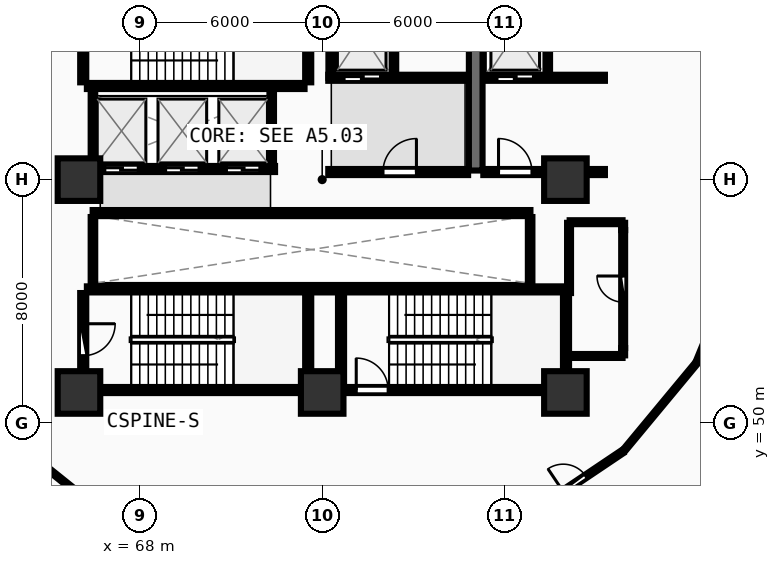
"""IFC4 building model, lengths in metres.
Left out: names, types, materials, properties, quantities, classifications, styles, units other than length and angle.
Written with IfcOpenShell. Run it as: python <this file> out.ifc"""

import sys

from ifc_helpers import new_model, si_unit, direction, frame, frame_2d, origin, origin_2d, place, context, subcontext, project, spatial, rectangle, extrude, element, fill, save


model = new_model("IFC4")
c1 = context("Model", 3, precision=1e-05, world=origin(), true_north=direction((0.0, 1.0)))
c2 = subcontext(c1, "Body", "Model", "MODEL_VIEW")
j1 = project(units=[si_unit("LENGTHUNIT", "METRE"), si_unit("PLANEANGLEUNIT", "RADIAN")], contexts=[c1])
p1 = place(None, origin())
s1 = spatial("IfcSite", under=j1, at=p1, CompositionType="ELEMENT")
p2 = place(p1, origin())
s2 = spatial("IfcBuilding", under=s1, at=p2, CompositionType="ELEMENT")
p3 = place(p2, frame((0.0, 0.0, 4.5)))
s3 = spatial("IfcBuildingStorey", under=s2, at=p3, CompositionType="ELEMENT", Elevation=4.5)
for number, where, z_axis, x_axis in (
    (1, (66.0, 51.0, 0.0), (0.0, 0.0, 1.0), (1.0, 0.0, 0.0)),
    (2, (74.0, 51.0, 0.0), (0.0, 0.0, 1.0), (1.0, 0.0, 0.0)),
    (3, (82.0, 51.0, 0.0), (0.0, 0.0, 1.0), (1.0, 0.0, 0.0)),
    (4, (82.0, 58.0, 0.0), (0.0, 0.0, 1.0), (1.0, 0.0, 0.0)),
    (5, (66.0, 58.0, 0.0), (0.0, 0.0, 1.0), (1.0, 0.0, 0.0)),
):
    element("IfcColumn", number, at=place(p3, frame(where, z_axis=z_axis, x_axis=x_axis)), inside=s3, PredefinedType="PILASTER", context=c2, shape_type="SweptSolid", body=[
        extrude(rectangle(XDim=1.4, YDim=1.4, at=origin_2d()), origin(), (0.0, 0.0, 1.0), 4.5),
    ])
p4 = place(p3, frame((66.26, 61.08, 0.0), z_axis=(0.0, 0.0, 1.0), x_axis=(1.0, 0.0, 0.0)))
e6 = element("IfcWall", 6, at=p4, inside=s3, PredefinedType="SHEAR", context=c2, shape_type="SweptSolid", body=[
    extrude(rectangle(XDim=7.16, YDim=0.2, at=frame_2d((3.58, 0.0))), origin(), (0.0, 0.0, 1.0), 4.2),
])
p5 = place(p3, frame((73.54, 61.2, 0.0), z_axis=(0.0, 0.0, 1.0), x_axis=(0.0, 1.0, 0.0)))
e7 = element("IfcWall", 7, at=p5, inside=s3, PredefinedType="SHEAR", context=c2, shape_type="SweptSolid", body=[
    extrude(rectangle(XDim=3.07, YDim=0.2, at=frame_2d((1.535, 0.0))), origin(), (0.0, 0.0, 1.0), 4.2),
])
p6 = place(p3, frame((66.14, 64.27, 0.0), z_axis=(0.0, 0.0, 1.0), x_axis=(0.0, -1.0, 0.0)))
e8 = element("IfcWall", 8, at=p6, inside=s3, PredefinedType="SHEAR", context=c2, shape_type="SweptSolid", body=[
    extrude(rectangle(XDim=3.07, YDim=0.2, at=frame_2d((1.535, 0.0))), origin(), (0.0, 0.0, 1.0), 4.2),
])
p7 = place(p6, frame((1.01, 0.0, 0.0)))
e9 = element("IfcOpeningElement", 9, at=p7, cuts=e8, PredefinedType="OPENING", context=c2, shape_type="SweptSolid", body=[
    extrude(rectangle(XDim=1.05, YDim=2.1, at=frame_2d((0.525, 1.05))), frame((0.0, 0.11, 0.0), z_axis=(0.0, -1.0, 0.0), x_axis=(1.0, 0.0, 0.0)), (0.0, 0.0, 1.0), 0.22),
])
p8 = place(p3, frame((74.0, 51.08, 0.0), z_axis=(0.0, 0.0, 1.0), x_axis=(1.0, 0.0, 0.0)))
e10 = element("IfcWall", 10, at=p8, inside=s3, PredefinedType="SHEAR", context=c2, shape_type="SweptSolid", body=[
    extrude(rectangle(XDim=7.9, YDim=0.2, at=frame_2d((3.95, 0.0))), origin(), (0.0, 0.0, 1.0), 4.2),
])
p9 = place(p8, frame((1.12, 0.0, 0.0)))
e11 = element("IfcOpeningElement", 11, at=p9, cuts=e10, PredefinedType="OPENING", context=c2, shape_type="SweptSolid", body=[
    extrude(rectangle(XDim=1.05, YDim=2.1, at=frame_2d((0.525, 1.05))), frame((0.0, 0.11, 0.0), z_axis=(0.0, -1.0, 0.0), x_axis=(1.0, 0.0, 0.0)), (0.0, 0.0, 1.0), 0.22),
])
p10 = place(p3, frame((82.02, 51.2, 0.0), z_axis=(0.0, 0.0, 1.0), x_axis=(0.0, 1.0, 0.0)))
e12 = element("IfcWall", 12, at=p10, inside=s3, PredefinedType="SHEAR", context=c2, shape_type="SweptSolid", body=[
    extrude(rectangle(XDim=3.07, YDim=0.2, at=frame_2d((1.535, 0.0))), origin(), (0.0, 0.0, 1.0), 4.2),
])
p11 = place(p3, frame((81.9, 54.39, 0.0), z_axis=(0.0, 0.0, 1.0), x_axis=(-1.0, 0.0, 0.0)))
e13 = element("IfcWall", 13, at=p11, inside=s3, PredefinedType="SHEAR", context=c2, shape_type="SweptSolid", body=[
    extrude(rectangle(XDim=8.46, YDim=0.2, at=frame_2d((4.23, 0.0))), origin(), (0.0, 0.0, 1.0), 4.2),
])
p12 = place(p3, frame((74.62, 54.27, 0.0), z_axis=(0.0, 0.0, 1.0), x_axis=(0.0, -1.0, 0.0)))
e14 = element("IfcWall", 14, at=p12, inside=s3, PredefinedType="SHEAR", context=c2, shape_type="SweptSolid", body=[
    extrude(rectangle(XDim=3.07, YDim=0.2, at=frame_2d((1.535, 0.0))), origin(), (0.0, 0.0, 1.0), 4.2),
])
p13 = place(p3, frame((66.26, 51.08, 0.0), z_axis=(0.0, 0.0, 1.0), x_axis=(1.0, 0.0, 0.0)))
e15 = element("IfcWall", 15, at=p13, inside=s3, PredefinedType="SHEAR", context=c2, shape_type="SweptSolid", body=[
    extrude(rectangle(XDim=7.16, YDim=0.2, at=frame_2d((3.58, 0.0))), origin(), (0.0, 0.0, 1.0), 4.2),
])
p14 = place(p3, frame((73.54, 51.2, 0.0), z_axis=(0.0, 0.0, 1.0), x_axis=(0.0, 1.0, 0.0)))
e16 = element("IfcWall", 16, at=p14, inside=s3, PredefinedType="SHEAR", context=c2, shape_type="SweptSolid", body=[
    extrude(rectangle(XDim=3.07, YDim=0.2, at=frame_2d((1.535, 0.0))), origin(), (0.0, 0.0, 1.0), 4.2),
])
p15 = place(p3, frame((73.42, 54.39, 0.0), z_axis=(0.0, 0.0, 1.0), x_axis=(-1.0, 0.0, 0.0)))
e17 = element("IfcWall", 17, at=p15, inside=s3, PredefinedType="SHEAR", context=c2, shape_type="SweptSolid", body=[
    extrude(rectangle(XDim=7.16, YDim=0.2, at=frame_2d((3.58, 0.0))), origin(), (0.0, 0.0, 1.0), 4.2),
])
p16 = place(p3, frame((66.14, 54.27, 0.0), z_axis=(0.0, 0.0, 1.0), x_axis=(0.0, -1.0, 0.0)))
e18 = element("IfcWall", 18, at=p16, inside=s3, PredefinedType="SHEAR", context=c2, shape_type="SweptSolid", body=[
    extrude(rectangle(XDim=3.07, YDim=0.2, at=frame_2d((1.535, 0.0))), origin(), (0.0, 0.0, 1.0), 4.2),
])
p17 = place(p16, frame((1.01, 0.0, 0.0)))
e19 = element("IfcOpeningElement", 19, at=p17, cuts=e18, PredefinedType="OPENING", context=c2, shape_type="SweptSolid", body=[
    extrude(rectangle(XDim=1.05, YDim=2.1, at=frame_2d((0.525, 1.05))), frame((0.0, 0.11, 0.0), z_axis=(0.0, -1.0, 0.0), x_axis=(1.0, 0.0, 0.0)), (0.0, 0.0, 1.0), 0.22),
])
p18 = place(p3, frame((79.05, 58.3, 0.0), z_axis=(0.0, 0.0, 1.0), x_axis=(0.0, 1.0, 0.0)))
e20 = element("IfcWall", 20, at=p18, inside=s3, PredefinedType="SHEAR", context=c2, shape_type="SweptSolid", body=[
    extrude(rectangle(XDim=6.3, YDim=0.45, at=frame_2d((3.15, 0.0))), origin(), (0.0, 0.0, 1.0), 4.2),
])
p19 = place(p3, frame((74.2, 61.35, 0.0), z_axis=(0.0, 0.0, 1.0), x_axis=(1.0, 0.0, 0.0)))
e21 = element("IfcWall", 21, at=p19, inside=s3, PredefinedType="SOLIDWALL", context=c2, shape_type="SweptSolid", body=[
    extrude(rectangle(XDim=4.6, YDim=0.2, at=frame_2d((2.3, 0.0))), origin(), (0.0, 0.0, 1.0), 4.19),
])
p20 = place(p19, frame((0.52, 0.0, 0.0)))
e22 = element("IfcOpeningElement", 22, at=p20, cuts=e21, PredefinedType="OPENING", context=c2, shape_type="SweptSolid", body=[
    extrude(rectangle(XDim=1.2, YDim=2.15, at=frame_2d((0.6, 1.075))), frame((0.0, 0.11, 0.0), z_axis=(0.0, -1.0, 0.0), x_axis=(1.0, 0.0, 0.0)), (0.0, 0.0, 1.0), 0.22),
])
p21 = place(p3, frame((74.28, 61.35, 0.0), z_axis=(0.0, 0.0, 1.0), x_axis=(0.0, 1.0, 0.0)))
e23 = element("IfcWall", 23, at=p21, inside=s3, PredefinedType="PARTITIONING", context=c2, shape_type="SweptSolid", body=[
    extrude(rectangle(XDim=2.97, YDim=0.15, at=frame_2d((1.485, 0.0))), origin(), (0.0, 0.0, 1.0), 4.19),
])
p22 = place(p3, frame((76.36, 61.48, 0.0), z_axis=(0.0, 0.0, 1.0), x_axis=(0.0, 1.0, 0.0)))
e24 = element("IfcWall", 24, at=p22, inside=s3, PredefinedType="PARTITIONING", context=c2, shape_type="SweptSolid", body=[
    extrude(rectangle(XDim=2.84, YDim=0.15, at=frame_2d((1.42, 0.0))), origin(), (0.0, 0.0, 1.0), 4.19),
])
p23 = place(p3, frame((79.3, 61.35, 0.0), z_axis=(0.0, 0.0, 1.0), x_axis=(1.0, 0.0, 0.0)))
e25 = element("IfcWall", 25, at=p23, inside=s3, PredefinedType="SOLIDWALL", context=c2, shape_type="SweptSolid", body=[
    extrude(rectangle(XDim=4.0, YDim=0.2, at=frame_2d((2.0, 0.0))), origin(), (0.0, 0.0, 1.0), 3.485),
])
p24 = place(p23, frame((0.45, 0.0, 0.0)))
e26 = element("IfcOpeningElement", 26, at=p24, cuts=e25, PredefinedType="OPENING", context=c2, shape_type="SweptSolid", body=[
    extrude(rectangle(XDim=1.2, YDim=2.15, at=frame_2d((0.6, 1.075))), frame((0.0, 0.11, 0.0), z_axis=(0.0, -1.0, 0.0), x_axis=(1.0, 0.0, 0.0)), (0.0, 0.0, 1.0), 0.22),
])
p25 = place(p3, frame((81.42, 61.48, 0.0), z_axis=(0.0, 0.0, 1.0), x_axis=(0.0, 1.0, 0.0)))
e27 = element("IfcWall", 27, at=p25, inside=s3, PredefinedType="PARTITIONING", context=c2, shape_type="SweptSolid", body=[
    extrude(rectangle(XDim=2.84, YDim=0.15, at=frame_2d((1.42, 0.0))), origin(), (0.0, 0.0, 1.0), 4.19),
])
p26 = place(p3, frame((74.2, 58.25, 0.0), z_axis=(0.0, 0.0, 1.0), x_axis=(1.0, 0.0, 0.0)))
e28 = element("IfcWall", 28, at=p26, inside=s3, PredefinedType="SOLIDWALL", context=c2, shape_type="SweptSolid", body=[
    extrude(rectangle(XDim=4.6, YDim=0.2, at=frame_2d((2.3, 0.0))), origin(), (0.0, 0.0, 1.0), 4.19),
])
p27 = place(p26, frame((1.8, 0.0, 0.0)))
e29 = element("IfcOpeningElement", 29, at=p27, cuts=e28, PredefinedType="OPENING", context=c2, shape_type="SweptSolid", body=[
    extrude(rectangle(XDim=1.1, YDim=2.1, at=frame_2d((0.55, 1.05))), frame((0.0, 0.11, 0.0), z_axis=(0.0, -1.0, 0.0), x_axis=(1.0, 0.0, 0.0)), (0.0, 0.0, 1.0), 0.22),
])
p28 = place(p3, frame((79.3, 58.25, 0.0), z_axis=(0.0, 0.0, 1.0), x_axis=(1.0, 0.0, 0.0)))
e30 = element("IfcWall", 30, at=p28, inside=s3, PredefinedType="SOLIDWALL", context=c2, shape_type="SweptSolid", body=[
    extrude(rectangle(XDim=4.0, YDim=0.2, at=frame_2d((2.0, 0.0))), origin(), (0.0, 0.0, 1.0), 3.485),
])
p29 = place(p28, frame((0.5, 0.0, 0.0)))
e31 = element("IfcOpeningElement", 31, at=p29, cuts=e30, PredefinedType="OPENING", context=c2, shape_type="SweptSolid", body=[
    extrude(rectangle(XDim=1.1, YDim=2.1, at=frame_2d((0.55, 1.05))), frame((0.0, 0.11, 0.0), z_axis=(0.0, -1.0, 0.0), x_axis=(1.0, 0.0, 0.0)), (0.0, 0.0, 1.0), 0.22),
])
p30 = place(p3, frame((66.45, 58.35, 0.0), z_axis=(0.0, 0.0, 1.0), x_axis=(1.0, 0.0, 0.0)))
e32 = element("IfcWall", 32, at=p30, inside=s3, PredefinedType="SOLIDWALL", context=c2, shape_type="SweptSolid", body=[
    extrude(rectangle(XDim=6.0, YDim=0.2, at=frame_2d((3.0, 0.0))), origin(), (0.0, 0.0, 1.0), 4.19),
])
p31 = place(p30, frame((0.4, 0.0, 0.0)))
e33 = element("IfcOpeningElement", 33, at=p31, cuts=e32, PredefinedType="OPENING", context=c2, shape_type="SweptSolid", body=[
    extrude(rectangle(XDim=1.1, YDim=2.1, at=frame_2d((0.55, 1.05))), frame((0.0, 0.11, 0.0), z_axis=(0.0, -1.0, 0.0), x_axis=(1.0, 0.0, 0.0)), (0.0, 0.0, 1.0), 0.22),
])
p32 = place(p30, frame((2.4, 0.0, 0.0)))
e34 = element("IfcOpeningElement", 34, at=p32, cuts=e32, PredefinedType="OPENING", context=c2, shape_type="SweptSolid", body=[
    extrude(rectangle(XDim=1.1, YDim=2.1, at=frame_2d((0.55, 1.05))), frame((0.0, 0.11, 0.0), z_axis=(0.0, -1.0, 0.0), x_axis=(1.0, 0.0, 0.0)), (0.0, 0.0, 1.0), 0.22),
])
p33 = place(p30, frame((4.4, 0.0, 0.0)))
e35 = element("IfcOpeningElement", 35, at=p33, cuts=e32, PredefinedType="OPENING", context=c2, shape_type="SweptSolid", body=[
    extrude(rectangle(XDim=1.1, YDim=2.1, at=frame_2d((0.55, 1.05))), frame((0.0, 0.11, 0.0), z_axis=(0.0, -1.0, 0.0), x_axis=(1.0, 0.0, 0.0)), (0.0, 0.0, 1.0), 0.22),
])
for number, where, z_axis, x_axis in (
    (36, (66.46, 58.48, 0.0), (0.0, 0.0, 1.0), (0.0, 1.0, 0.0)),
    (37, (72.34, 58.48, 0.0), (0.0, 0.0, 1.0), (0.0, 1.0, 0.0)),
):
    element("IfcWall", number, at=place(p3, frame(where, z_axis=z_axis, x_axis=x_axis)), inside=s3, PredefinedType="PARTITIONING", context=c2, shape_type="SweptSolid", body=[
        extrude(rectangle(XDim=2.46, YDim=0.15, at=frame_2d((1.23, 0.0))), origin(), (0.0, 0.0, 1.0), 4.19),
    ])
p34 = place(p3, frame((66.45, 56.9, 0.0), z_axis=(0.0, 0.0, 1.0), x_axis=(1.0, 0.0, 0.0)))
e38 = element("IfcWall", 38, at=p34, inside=s3, PredefinedType="SOLIDWALL", context=c2, shape_type="SweptSolid", body=[
    extrude(rectangle(XDim=14.4, YDim=0.2, at=frame_2d((7.2, 0.0))), origin(), (0.0, 0.0, 1.0), 4.19),
])
for number, where, z_axis, x_axis in (
    (39, (66.46, 54.48, 0.0), (0.0, 0.0, 1.0), (0.0, 1.0, 0.0)),
    (40, (80.84, 54.48, 0.0), (0.0, 0.0, 1.0), (0.0, 1.0, 0.0)),
):
    element("IfcWall", number, at=place(p3, frame(where, z_axis=z_axis, x_axis=x_axis)), inside=s3, PredefinedType="PARTITIONING", context=c2, shape_type="SweptSolid", body=[
        extrude(rectangle(XDim=2.29, YDim=0.15, at=frame_2d((1.145, 0.0))), origin(), (0.0, 0.0, 1.0), 4.19),
    ])
p35 = place(p3, frame((83.9, 52.46, 0.0), z_axis=(0.0, 0.0, 1.0), x_axis=(0.0, 1.0, 0.0)))
e41 = element("IfcWall", 41, at=p35, inside=s3, PredefinedType="PLUMBINGWALL", context=c2, shape_type="SweptSolid", body=[
    extrude(rectangle(XDim=3.88, YDim=0.13, at=frame_2d((1.94, 0.0))), origin(), (0.0, 0.0, 1.0), 4.19),
])
p36 = place(p35, frame((1.51, 0.0, 0.0)))
e42 = element("IfcOpeningElement", 42, at=p36, cuts=e41, PredefinedType="OPENING", context=c2, shape_type="SweptSolid", body=[
    extrude(rectangle(XDim=0.86, YDim=2.05, at=frame_2d((0.43, 1.025))), frame((0.0, 0.075, 0.0), z_axis=(0.0, -1.0, 0.0), x_axis=(1.0, 0.0, 0.0)), (0.0, 0.0, 1.0), 0.15),
])
p37 = place(p3, frame((80.74, 46.942, 0.0), z_axis=(0.0, 0.0, 1.0), x_axis=(0.829949208051, 0.557838966061, 0.0)))
e43 = element("IfcWall", 43, at=p37, inside=s3, PredefinedType="PARTITIONING", context=c2, shape_type="SweptSolid", body=[
    extrude(rectangle(XDim=3.765, YDim=0.12, at=frame_2d((1.882, 0.0))), origin(), (0.0, 0.0, 1.0), 3.585),
])
p38 = place(p37, frame((1.432, 0.0, 0.0)))
e44 = element("IfcOpeningElement", 44, at=p38, cuts=e43, PredefinedType="OPENING", context=c2, shape_type="SweptSolid", body=[
    extrude(rectangle(XDim=0.9, YDim=2.08, at=frame_2d((0.45, 1.04))), frame((0.0, 0.07, 0.0), z_axis=(0.0, -1.0, 0.0), x_axis=(1.0, 0.0, 0.0)), (0.0, 0.0, 1.0), 0.14),
])
p39 = place(p3, frame((82.14, 52.2, 0.0), z_axis=(0.0, 0.0, 1.0), x_axis=(1.0, 0.0, 0.0)))
e45 = element("IfcWall", 45, at=p39, inside=s3, PredefinedType="PLUMBINGWALL", context=c2, shape_type="SweptSolid", body=[
    extrude(rectangle(XDim=1.74, YDim=0.13, at=frame_2d((0.87, 0.0))), origin(), (0.0, 0.0, 1.0), 3.485),
])
for number, where, z_axis, x_axis in (
    (46, (83.9, 52.22, 0.0), (0.0, 0.0, 1.0), (0.0, 1.0, 0.0)),
    (47, (83.9, 56.34, 0.0), (0.0, 0.0, 1.0), (0.0, 1.0, 0.0)),
):
    element("IfcWall", number, at=place(p3, frame(where, z_axis=z_axis, x_axis=x_axis)), inside=s3, PredefinedType="PLUMBINGWALL", context=c2, shape_type="SweptSolid", body=[
        extrude(rectangle(XDim=0.24, YDim=0.13, at=frame_2d((0.12, 0.0))), origin(), (0.0, 0.0, 1.0), 4.19),
    ])
p40 = place(p3, frame((83.88, 56.6, 0.0), z_axis=(0.0, 0.0, 1.0), x_axis=(-1.0, 0.0, 0.0)))
e48 = element("IfcWall", 48, at=p40, inside=s3, PredefinedType="PLUMBINGWALL", context=c2, shape_type="SweptSolid", body=[
    extrude(rectangle(XDim=1.74, YDim=0.13, at=frame_2d((0.87, 0.0))), origin(), (0.0, 0.0, 1.0), 3.485),
])
p41 = place(p3, frame((82.12, 56.58, 0.0), z_axis=(0.0, 0.0, 1.0), x_axis=(0.0, -1.0, 0.0)))
e49 = element("IfcWall", 49, at=p41, inside=s3, PredefinedType="PLUMBINGWALL", context=c2, shape_type="SweptSolid", body=[
    extrude(rectangle(XDim=2.31, YDim=0.13, at=frame_2d((1.155, 0.0))), origin(), (0.0, 0.0, 1.0), 3.485),
])
p42 = place(p3, frame((63.37, 49.779, 0.0), z_axis=(0.0, 0.0, 1.0), x_axis=(0.779622016763, -0.626250358067, 0.0)))
e50 = element("IfcWall", 50, at=p42, inside=s3, PredefinedType="PARTITIONING", context=c2, shape_type="SweptSolid", body=[
    extrude(rectangle(XDim=3.539, YDim=0.1, at=frame_2d((1.769, 0.0))), origin(), (0.0, 0.0, 1.0), 3.585),
])
p43 = place(p3, frame((83.939, 49.107, 0.0), z_axis=(0.0, 0.0, 1.0), x_axis=(0.638393231466, 0.769710388405, 0.0)))
e51 = element("IfcWall", 51, at=p43, inside=s3, PredefinedType="PARTITIONING", context=c2, shape_type="SweptSolid", body=[
    extrude(rectangle(XDim=3.69, YDim=0.1, at=frame_2d((1.845, 0.0))), origin(), (0.0, 0.0, 1.0), 3.585),
])
p44 = place(p3, frame((86.336, 52.015, 0.0), z_axis=(0.0, 0.0, 1.0), x_axis=(0.379262523909, 0.925289110472, 0.0)))
e52 = element("IfcWall", 52, at=p44, inside=s3, PredefinedType="PARTITIONING", context=c2, shape_type="SweptSolid", body=[
    extrude(rectangle(XDim=3.593, YDim=0.1, at=frame_2d((1.796, 0.0))), origin(), (0.0, 0.0, 1.0), 4.19),
])
p45 = place(p9, origin())
e53 = element("IfcDoor", 53, at=p45, inside=s3, OperationType="SINGLE_SWING_LEFT", PredefinedType="DOOR", context=c2, shape_type="SweptSolid", body=[
    extrude(rectangle(XDim=1.05, YDim=2.1, at=frame_2d((0.525, 1.05))), frame((0.0, 0.025, 0.0), z_axis=(0.0, -1.0, 0.0), x_axis=(1.0, 0.0, 0.0)), (0.0, 0.0, 1.0), 0.05),
])
fill(e11, e53)
p46 = place(p17, origin())
e54 = element("IfcDoor", 54, at=p46, inside=s3, OperationType="SINGLE_SWING_LEFT", PredefinedType="DOOR", context=c2, shape_type="SweptSolid", body=[
    extrude(rectangle(XDim=1.05, YDim=2.1, at=frame_2d((0.525, 1.05))), frame((0.0, 0.025, 0.0), z_axis=(0.0, -1.0, 0.0), x_axis=(1.0, 0.0, 0.0)), (0.0, 0.0, 1.0), 0.05),
])
fill(e19, e54)
p47 = place(p20, origin())
e55 = element("IfcDoor", 55, at=p47, inside=s3, OperationType="DOUBLE_DOOR_SLIDING", PredefinedType="DOOR", context=c2, shape_type="SweptSolid", body=[
    extrude(rectangle(XDim=1.2, YDim=2.15, at=frame_2d((0.6, 1.075))), frame((0.0, 0.025, 0.0), z_axis=(0.0, -1.0, 0.0), x_axis=(1.0, 0.0, 0.0)), (0.0, 0.0, 1.0), 0.05),
])
fill(e22, e55)
p48 = place(p24, origin())
e56 = element("IfcDoor", 56, at=p48, inside=s3, OperationType="DOUBLE_DOOR_SLIDING", PredefinedType="DOOR", context=c2, shape_type="SweptSolid", body=[
    extrude(rectangle(XDim=1.2, YDim=2.15, at=frame_2d((0.6, 1.075))), frame((0.0, 0.025, 0.0), z_axis=(0.0, -1.0, 0.0), x_axis=(1.0, 0.0, 0.0)), (0.0, 0.0, 1.0), 0.05),
])
fill(e26, e56)
p49 = place(p27, frame((1.1, 0.0, 0.0), z_axis=(0.0, 0.0, 1.0), x_axis=(-1.0, 0.0, 0.0)))
e57 = element("IfcDoor", 57, at=p49, inside=s3, OperationType="SINGLE_SWING_LEFT", PredefinedType="DOOR", context=c2, shape_type="SweptSolid", body=[
    extrude(rectangle(XDim=1.1, YDim=2.1, at=frame_2d((0.55, 1.05))), frame((0.0, 0.025, 0.0), z_axis=(0.0, -1.0, 0.0), x_axis=(1.0, 0.0, 0.0)), (0.0, 0.0, 1.0), 0.05),
])
fill(e29, e57)
p50 = place(p29, frame((1.1, 0.0, 0.0), z_axis=(0.0, 0.0, 1.0), x_axis=(-1.0, 0.0, 0.0)))
e58 = element("IfcDoor", 58, at=p50, inside=s3, OperationType="SINGLE_SWING_RIGHT", PredefinedType="DOOR", context=c2, shape_type="SweptSolid", body=[
    extrude(rectangle(XDim=1.1, YDim=2.1, at=frame_2d((0.55, 1.05))), frame((0.0, 0.025, 0.0), z_axis=(0.0, -1.0, 0.0), x_axis=(1.0, 0.0, 0.0)), (0.0, 0.0, 1.0), 0.05),
])
fill(e31, e58)
p51 = place(p31, origin())
e59 = element("IfcDoor", 59, at=p51, inside=s3, OperationType="DOUBLE_DOOR_SLIDING", PredefinedType="DOOR", context=c2, shape_type="SweptSolid", body=[
    extrude(rectangle(XDim=1.1, YDim=2.1, at=frame_2d((0.55, 1.05))), frame((0.0, 0.025, 0.0), z_axis=(0.0, -1.0, 0.0), x_axis=(1.0, 0.0, 0.0)), (0.0, 0.0, 1.0), 0.05),
])
fill(e33, e59)
p52 = place(p32, origin())
e60 = element("IfcDoor", 60, at=p52, inside=s3, OperationType="DOUBLE_DOOR_SLIDING", PredefinedType="DOOR", context=c2, shape_type="SweptSolid", body=[
    extrude(rectangle(XDim=1.1, YDim=2.1, at=frame_2d((0.55, 1.05))), frame((0.0, 0.025, 0.0), z_axis=(0.0, -1.0, 0.0), x_axis=(1.0, 0.0, 0.0)), (0.0, 0.0, 1.0), 0.05),
])
fill(e34, e60)
p53 = place(p33, origin())
e61 = element("IfcDoor", 61, at=p53, inside=s3, OperationType="DOUBLE_DOOR_SLIDING", PredefinedType="DOOR", context=c2, shape_type="SweptSolid", body=[
    extrude(rectangle(XDim=1.1, YDim=2.1, at=frame_2d((0.55, 1.05))), frame((0.0, 0.025, 0.0), z_axis=(0.0, -1.0, 0.0), x_axis=(1.0, 0.0, 0.0)), (0.0, 0.0, 1.0), 0.05),
])
fill(e35, e61)
p54 = place(p36, origin())
e62 = element("IfcDoor", 62, at=p54, inside=s3, OperationType="SINGLE_SWING_RIGHT", PredefinedType="DOOR", context=c2, shape_type="SweptSolid", body=[
    extrude(rectangle(XDim=0.86, YDim=2.05, at=frame_2d((0.43, 1.025))), frame((0.0, 0.025, 0.0), z_axis=(0.0, -1.0, 0.0), x_axis=(1.0, 0.0, 0.0)), (0.0, 0.0, 1.0), 0.05),
])
fill(e42, e62)
p55 = place(p38, origin())
e63 = element("IfcDoor", 63, at=p55, inside=s3, OperationType="SINGLE_SWING_LEFT", PredefinedType="DOOR", context=c2, shape_type="SweptSolid", body=[
    extrude(rectangle(XDim=0.9, YDim=2.08, at=frame_2d((0.45, 1.04))), frame((0.0, 0.025, 0.0), z_axis=(0.0, -1.0, 0.0), x_axis=(1.0, 0.0, 0.0)), (0.0, 0.0, 1.0), 0.05),
])
fill(e44, e63)
save(model, sys.argv[1])
